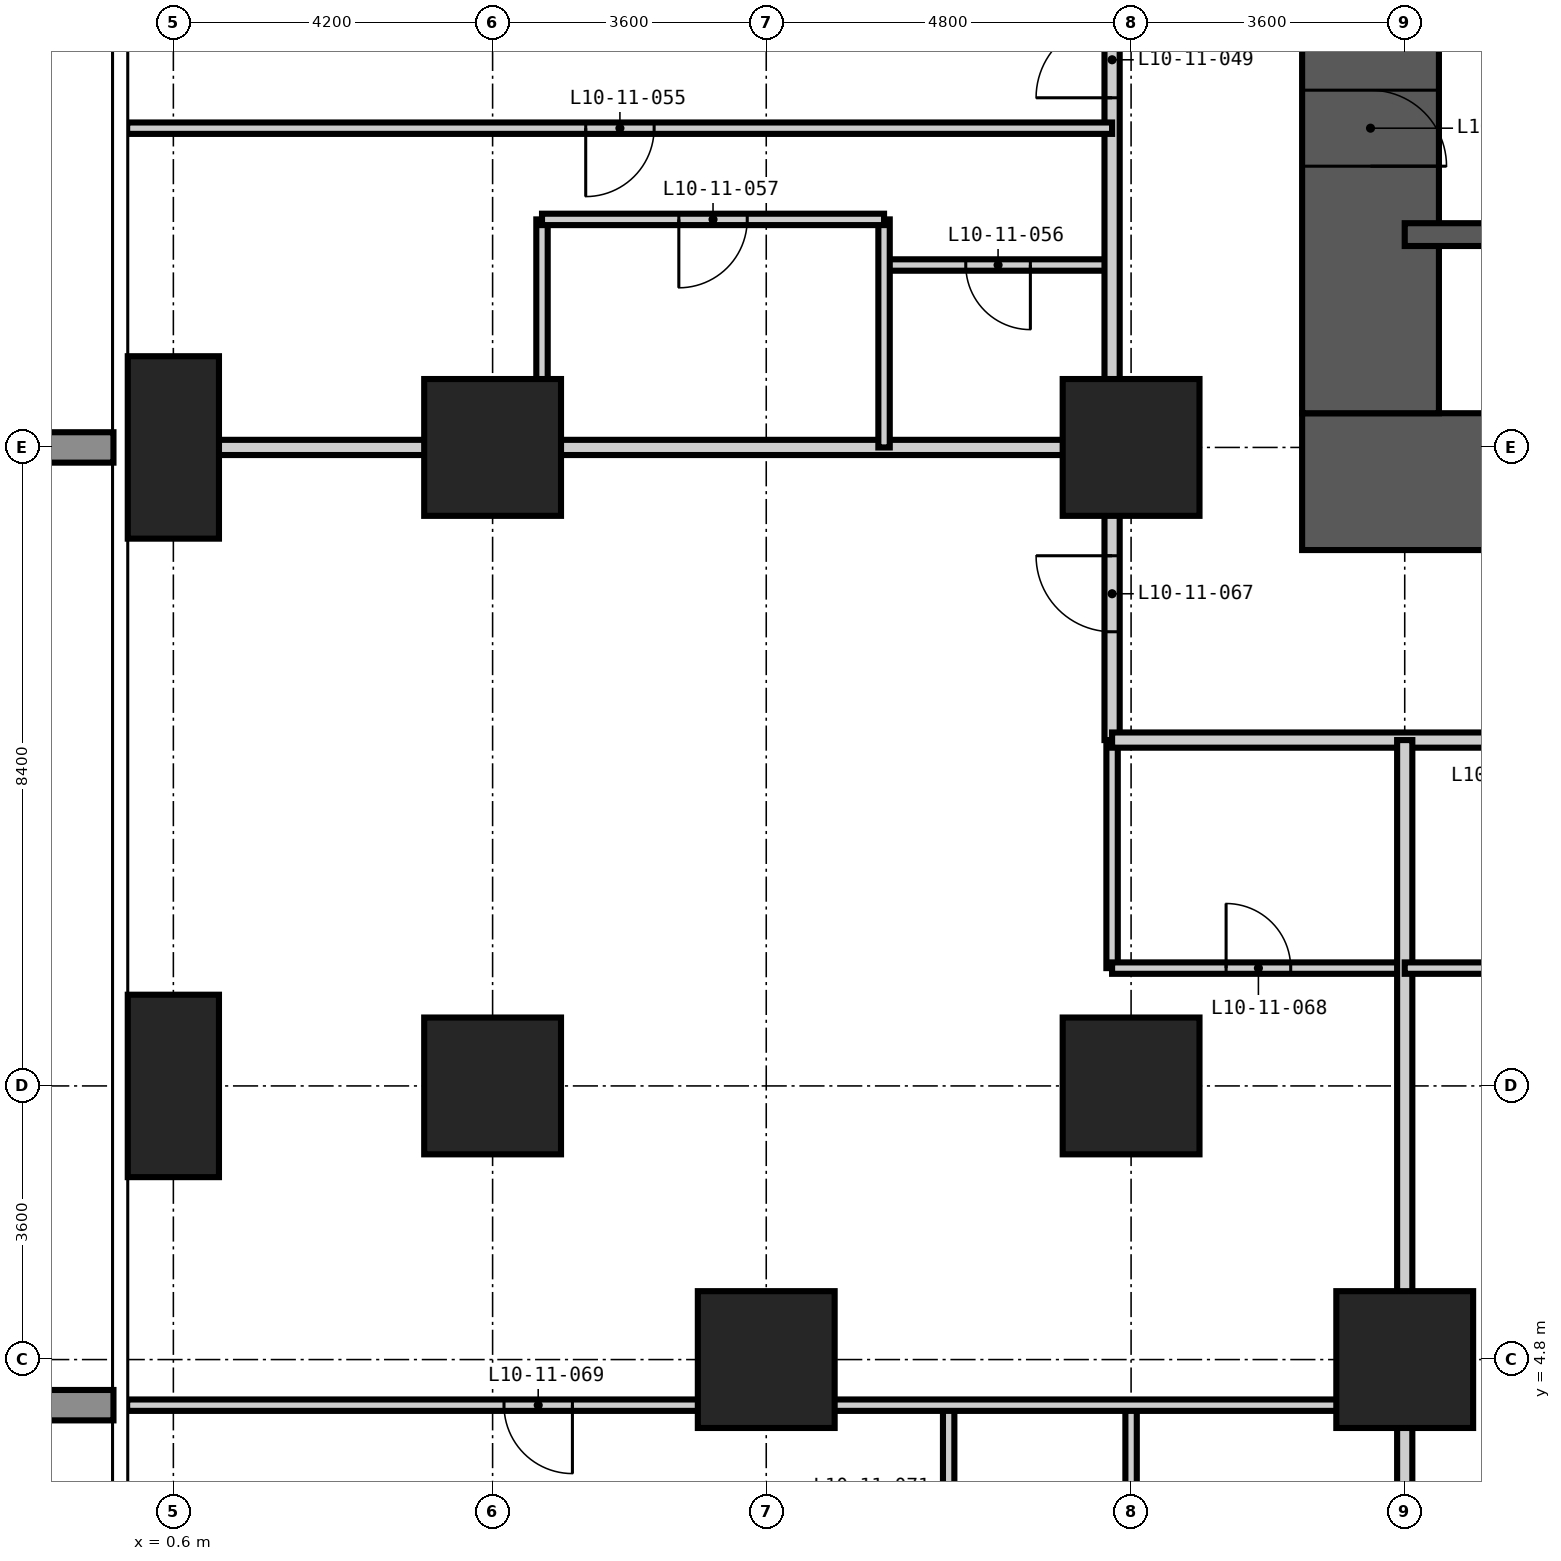
"""IFC4 building model, lengths in metres.
Left out: names, types, materials, properties, quantities, classifications, styles, units other than length and angle.
Written with IfcOpenShell. Run it as: python <this file> out.ifc"""

import sys

from ifc_helpers import new_model, si_unit, direction, frame, frame_2d, origin, origin_2d, place, context, subcontext, project, spatial, rectangle, extrude, element, fill, save


model = new_model("IFC4")
c1 = context("Model", 3, precision=1e-05, world=origin(), true_north=direction((0.0, 1.0)))
c2 = subcontext(c1, "Body", "Model", "MODEL_VIEW")
j1 = project(units=[si_unit("LENGTHUNIT", "METRE"), si_unit("PLANEANGLEUNIT", "RADIAN")], contexts=[c1])
p1 = place(None, origin())
s1 = spatial("IfcSite", under=j1, at=p1, CompositionType="ELEMENT")
p2 = place(p1, origin())
s2 = spatial("IfcBuilding", under=s1, at=p2, CompositionType="ELEMENT")
p3 = place(p2, frame((0.0, 0.0, 45.0)))
s3 = spatial("IfcBuildingStorey", under=s2, at=p3, CompositionType="ELEMENT", Elevation=45.0)
for number, where, z_axis, x_axis in (
    (1, (0.6, 8.4, -0.35), (0.0, 0.0, 1.0), (1.0, 0.0, 0.0)),
    (2, (0.6, 16.8, -0.35), (0.0, 0.0, 1.0), (1.0, 0.0, 0.0)),
):
    element("IfcColumn", number, at=place(p3, frame(where, z_axis=z_axis, x_axis=x_axis)), inside=s3, PredefinedType="COLUMN", context=c2, shape_type="SweptSolid", body=[
        extrude(rectangle(XDim=1.2, YDim=2.4, at=origin_2d()), origin(), (0.0, 0.0, 1.0), 3.6),
    ])
for number, where, z_axis, x_axis in (
    (3, (4.8, 8.4, -0.35), (0.0, 0.0, 1.0), (1.0, 0.0, 0.0)),
    (4, (4.8, 16.8, -0.35), (0.0, 0.0, 1.0), (1.0, 0.0, 0.0)),
    (5, (8.4, 4.8, -0.35), (0.0, 0.0, 1.0), (1.0, 0.0, 0.0)),
    (6, (13.2, 8.4, -0.35), (0.0, 0.0, 1.0), (1.0, 0.0, 0.0)),
    (7, (13.2, 16.8, -0.35), (0.0, 0.0, 1.0), (1.0, 0.0, 0.0)),
    (8, (16.8, 4.8, -0.35), (0.0, 0.0, 1.0), (1.0, 0.0, 0.0)),
):
    element("IfcColumn", number, at=place(p3, frame(where, z_axis=z_axis, x_axis=x_axis)), inside=s3, PredefinedType="COLUMN", context=c2, shape_type="SweptSolid", body=[
        extrude(rectangle(XDim=1.8, YDim=1.8, at=origin_2d()), origin(), (0.0, 0.0, 1.0), 3.6),
    ])
p4 = place(p3, frame((15.45, 16.35, -0.35), z_axis=(0.0, 0.0, 1.0), x_axis=(1.0, 0.0, 0.0)))
e9 = element("IfcWall", 9, at=p4, inside=s3, PredefinedType="SHEAR", context=c2, shape_type="SweptSolid", body=[
    extrude(rectangle(XDim=27.9, YDim=1.8, at=frame_2d((13.95, 0.0))), origin(), (0.0, 0.0, 1.0), 3.6),
])
p5 = place(p4, frame((13.45, 0.0, 0.35)))
e10 = element("IfcOpeningElement", 10, at=p5, cuts=e9, PredefinedType="OPENING", context=c2, shape_type="SweptSolid", body=[
    extrude(rectangle(XDim=1.0, YDim=2.1, at=frame_2d((0.5, 1.05))), frame((0.0, 0.91, 0.0), z_axis=(0.0, -1.0, 0.0), x_axis=(1.0, 0.0, 0.0)), (0.0, 0.0, 1.0), 1.82),
])
p6 = place(p4, frame((19.75, 0.0, 0.35)))
e11 = element("IfcOpeningElement", 11, at=p6, cuts=e9, PredefinedType="OPENING", context=c2, shape_type="SweptSolid", body=[
    extrude(rectangle(XDim=1.0, YDim=2.1, at=frame_2d((0.5, 1.05))), frame((0.0, 0.91, 0.0), z_axis=(0.0, -1.0, 0.0), x_axis=(1.0, 0.0, 0.0)), (0.0, 0.0, 1.0), 1.82),
])
p7 = place(p3, frame((16.35, 41.55, -0.35), z_axis=(0.0, 0.0, 1.0), x_axis=(0.0, -1.0, 0.0)))
e12 = element("IfcWall", 12, at=p7, inside=s3, PredefinedType="SHEAR", context=c2, shape_type="SweptSolid", body=[
    extrude(rectangle(XDim=24.3, YDim=1.8, at=frame_2d((12.15, 0.0))), origin(), (0.0, 0.0, 1.0), 3.6),
])
p8 = place(p7, frame((11.25, 0.0, 0.35)))
e13 = element("IfcOpeningElement", 13, at=p8, cuts=e12, PredefinedType="OPENING", context=c2, shape_type="SweptSolid", body=[
    extrude(rectangle(XDim=1.8, YDim=2.2, at=frame_2d((0.9, 1.1))), frame((0.0, 0.91, 0.0), z_axis=(0.0, -1.0, 0.0), x_axis=(1.0, 0.0, 0.0)), (0.0, 0.0, 1.0), 1.82),
])
p9 = place(p7, frame((20.05, 0.0, 0.35)))
e14 = element("IfcOpeningElement", 14, at=p9, cuts=e12, PredefinedType="OPENING", context=c2, shape_type="SweptSolid", body=[
    extrude(rectangle(XDim=1.0, YDim=2.1, at=frame_2d((0.5, 1.05))), frame((0.0, 0.91, 0.0), z_axis=(0.0, -1.0, 0.0), x_axis=(1.0, 0.0, 0.0)), (0.0, 0.0, 1.0), 1.82),
])
p10 = place(p7, frame((5.35, 0.0, 0.35)))
e15 = element("IfcOpeningElement", 15, at=p10, cuts=e12, PredefinedType="OPENING", context=c2, shape_type="SweptSolid", body=[
    extrude(rectangle(XDim=1.0, YDim=2.1, at=frame_2d((0.5, 1.05))), frame((0.0, 0.91, 0.0), z_axis=(0.0, -1.0, 0.0), x_axis=(1.0, 0.0, 0.0)), (0.0, 0.0, 1.0), 1.82),
])
p11 = place(p3, frame((16.8, 19.6, -0.35), z_axis=(0.0, 0.0, 1.0), x_axis=(1.0, 0.0, 0.0)))
e16 = element("IfcWall", 16, at=p11, inside=s3, PredefinedType="SHEAR", context=c2, shape_type="SweptSolid", body=[
    extrude(rectangle(XDim=8.4, YDim=0.3, at=frame_2d((4.2, 0.0))), origin(), (0.0, 0.0, 1.0), 3.6),
])
p12 = place(p3, frame((12.95, 9.95, 0.0), z_axis=(0.0, 0.0, 1.0), x_axis=(0.0, 1.0, 0.0)))
e17 = element("IfcWall", 17, at=p12, inside=s3, PredefinedType="PARTITIONING", context=c2, shape_type="SweptSolid", body=[
    extrude(rectangle(XDim=3.0, YDim=0.15, at=frame_2d((1.5, 0.0))), origin(), (0.0, 0.0, 1.0), 3.25),
])
p13 = place(p3, frame((12.95, 9.95, 0.0), z_axis=(0.0, 0.0, 1.0), x_axis=(1.0, 0.0, 0.0)))
e18 = element("IfcWall", 18, at=p13, inside=s3, PredefinedType="PARTITIONING", context=c2, shape_type="SweptSolid", body=[
    extrude(rectangle(XDim=3.85, YDim=0.15, at=frame_2d((1.925, 0.0))), origin(), (0.0, 0.0, 1.0), 3.25),
])
p14 = place(p13, frame((1.5, 0.0, 0.0)))
e19 = element("IfcOpeningElement", 19, at=p14, cuts=e18, PredefinedType="OPENING", context=c2, shape_type="SweptSolid", body=[
    extrude(rectangle(XDim=0.85, YDim=2.1, at=frame_2d((0.425, 1.05))), frame((0.0, 0.085, 0.0), z_axis=(0.0, -1.0, 0.0), x_axis=(1.0, 0.0, 0.0)), (0.0, 0.0, 1.0), 0.17),
])
p15 = place(p3, frame((9.95, 19.2, 0.0), z_axis=(0.0, 0.0, 1.0), x_axis=(1.0, 0.0, 0.0)))
e20 = element("IfcWall", 20, at=p15, inside=s3, PredefinedType="PARTITIONING", context=c2, shape_type="SweptSolid", body=[
    extrude(rectangle(XDim=3.0, YDim=0.15, at=frame_2d((1.5, 0.0))), origin(), (0.0, 0.0, 1.0), 3.25),
])
p16 = place(p15, frame((1.075, 0.0, 0.0)))
e21 = element("IfcOpeningElement", 21, at=p16, cuts=e20, PredefinedType="OPENING", context=c2, shape_type="SweptSolid", body=[
    extrude(rectangle(XDim=0.85, YDim=2.1, at=frame_2d((0.425, 1.05))), frame((0.0, 0.085, 0.0), z_axis=(0.0, -1.0, 0.0), x_axis=(1.0, 0.0, 0.0)), (0.0, 0.0, 1.0), 0.17),
])
p17 = place(p3, frame((12.95, 12.95, 0.0), z_axis=(0.0, 0.0, 1.0), x_axis=(0.0, 1.0, 0.0)))
e22 = element("IfcWall", 22, at=p17, inside=s3, PredefinedType="PARTITIONING", context=c2, shape_type="SweptSolid", body=[
    extrude(rectangle(XDim=32.6, YDim=0.2, at=frame_2d((16.3, 0.0))), origin(), (0.0, 0.0, 1.0), 3.25),
])
p18 = place(p17, frame((8.45, 0.0, 0.0)))
e23 = element("IfcOpeningElement", 23, at=p18, cuts=e22, PredefinedType="OPENING", context=c2, shape_type="SweptSolid", body=[
    extrude(rectangle(XDim=1.0, YDim=2.2, at=frame_2d((0.5, 1.1))), frame((0.0, 0.11, 0.0), z_axis=(0.0, -1.0, 0.0), x_axis=(1.0, 0.0, 0.0)), (0.0, 0.0, 1.0), 0.22),
])
p19 = place(p17, frame((16.7, 0.0, 0.0)))
e24 = element("IfcOpeningElement", 24, at=p19, cuts=e22, PredefinedType="OPENING", context=c2, shape_type="SweptSolid", body=[
    extrude(rectangle(XDim=1.0, YDim=2.2, at=frame_2d((0.5, 1.1))), frame((0.0, 0.11, 0.0), z_axis=(0.0, -1.0, 0.0), x_axis=(1.0, 0.0, 0.0)), (0.0, 0.0, 1.0), 0.22),
])
p20 = place(p17, frame((23.6, 0.0, 0.0)))
e25 = element("IfcOpeningElement", 25, at=p20, cuts=e22, PredefinedType="OPENING", context=c2, shape_type="SweptSolid", body=[
    extrude(rectangle(XDim=1.0, YDim=2.2, at=frame_2d((0.5, 1.1))), frame((0.0, 0.11, 0.0), z_axis=(0.0, -1.0, 0.0), x_axis=(1.0, 0.0, 0.0)), (0.0, 0.0, 1.0), 0.22),
])
p21 = place(p17, frame((25.1, 0.0, 0.0)))
e26 = element("IfcOpeningElement", 26, at=p21, cuts=e22, PredefinedType="OPENING", context=c2, shape_type="SweptSolid", body=[
    extrude(rectangle(XDim=1.0, YDim=2.2, at=frame_2d((0.5, 1.1))), frame((0.0, 0.11, 0.0), z_axis=(0.0, -1.0, 0.0), x_axis=(1.0, 0.0, 0.0)), (0.0, 0.0, 1.0), 0.22),
])
p22 = place(p17, frame((1.425, 0.0, 0.0)))
e27 = element("IfcOpeningElement", 27, at=p22, cuts=e22, PredefinedType="OPENING", context=c2, shape_type="SweptSolid", body=[
    extrude(rectangle(XDim=1.0, YDim=2.2, at=frame_2d((0.5, 1.1))), frame((0.0, 0.11, 0.0), z_axis=(0.0, -1.0, 0.0), x_axis=(1.0, 0.0, 0.0)), (0.0, 0.0, 1.0), 0.22),
])
p23 = place(p17, frame((30.325, 0.0, 0.0)))
e28 = element("IfcOpeningElement", 28, at=p23, cuts=e22, PredefinedType="OPENING", context=c2, shape_type="SweptSolid", body=[
    extrude(rectangle(XDim=1.0, YDim=2.2, at=frame_2d((0.5, 1.1))), frame((0.0, 0.11, 0.0), z_axis=(0.0, -1.0, 0.0), x_axis=(1.0, 0.0, 0.0)), (0.0, 0.0, 1.0), 0.22),
])
p24 = place(p3, frame((45.25, 12.95, 0.0), z_axis=(0.0, 0.0, 1.0), x_axis=(-1.0, 0.0, 0.0)))
e29 = element("IfcWall", 29, at=p24, inside=s3, PredefinedType="PARTITIONING", context=c2, shape_type="SweptSolid", body=[
    extrude(rectangle(XDim=32.3, YDim=0.2, at=frame_2d((16.15, 0.0))), origin(), (0.0, 0.0, 1.0), 3.25),
])
p25 = place(p24, frame((24.65, 0.0, 0.0)))
e30 = element("IfcOpeningElement", 30, at=p25, cuts=e29, PredefinedType="OPENING", context=c2, shape_type="SweptSolid", body=[
    extrude(rectangle(XDim=1.0, YDim=2.2, at=frame_2d((0.5, 1.1))), frame((0.0, 0.11, 0.0), z_axis=(0.0, -1.0, 0.0), x_axis=(1.0, 0.0, 0.0)), (0.0, 0.0, 1.0), 0.22),
])
p26 = place(p24, frame((16.25, 0.0, 0.0)))
e31 = element("IfcOpeningElement", 31, at=p26, cuts=e29, PredefinedType="OPENING", context=c2, shape_type="SweptSolid", body=[
    extrude(rectangle(XDim=1.0, YDim=2.2, at=frame_2d((0.5, 1.1))), frame((0.0, 0.11, 0.0), z_axis=(0.0, -1.0, 0.0), x_axis=(1.0, 0.0, 0.0)), (0.0, 0.0, 1.0), 0.22),
])
p27 = place(p24, frame((7.85, 0.0, 0.0)))
e32 = element("IfcOpeningElement", 32, at=p27, cuts=e29, PredefinedType="OPENING", context=c2, shape_type="SweptSolid", body=[
    extrude(rectangle(XDim=1.0, YDim=2.2, at=frame_2d((0.5, 1.1))), frame((0.0, 0.11, 0.0), z_axis=(0.0, -1.0, 0.0), x_axis=(1.0, 0.0, 0.0)), (0.0, 0.0, 1.0), 0.22),
])
for number, where, z_axis, x_axis in (
    (33, (16.8, -0.008, 0.0), (0.0, 0.0, 1.0), (0.0, 1.0, 0.0)),
    (34, (-0.008, 16.8, 0.0), (0.0, 0.0, 1.0), (1.0, 0.0, 0.0)),
):
    element("IfcWall", number, at=place(p3, frame(where, z_axis=z_axis, x_axis=x_axis)), inside=s3, PredefinedType="PARTITIONING", context=c2, shape_type="SweptSolid", body=[
        extrude(rectangle(XDim=12.958, YDim=0.2, at=frame_2d((6.479, 0.0))), origin(), (0.0, 0.0, 1.0), 3.25),
    ])
for number, where, z_axis, x_axis in (
    (35, (5.45, 16.8, 0.0), (0.0, 0.0, 1.0), (0.0, 1.0, 0.0)),
    (36, (9.95, 16.8, 0.0), (0.0, 0.0, 1.0), (0.0, 1.0, 0.0)),
):
    element("IfcWall", number, at=place(p3, frame(where, z_axis=z_axis, x_axis=x_axis)), inside=s3, PredefinedType="PARTITIONING", context=c2, shape_type="SweptSolid", body=[
        extrude(rectangle(XDim=3.0, YDim=0.15, at=frame_2d((1.5, 0.0))), origin(), (0.0, 0.0, 1.0), 3.25),
    ])
p28 = place(p3, frame((10.8, 1.2, 0.0), z_axis=(0.0, 0.0, 1.0), x_axis=(0.0, 1.0, 0.0)))
e37 = element("IfcWall", 37, at=p28, inside=s3, PredefinedType="PARTITIONING", context=c2, shape_type="SweptSolid", body=[
    extrude(rectangle(XDim=3.0, YDim=0.15, at=frame_2d((1.5, 0.0))), origin(), (0.0, 0.0, 1.0), 3.25),
])
p29 = place(p28, frame((1.05, 0.0, 0.0)))
e38 = element("IfcOpeningElement", 38, at=p29, cuts=e37, PredefinedType="OPENING", context=c2, shape_type="SweptSolid", body=[
    extrude(rectangle(XDim=0.9, YDim=2.1, at=frame_2d((0.45, 1.05))), frame((0.0, 0.085, 0.0), z_axis=(0.0, -1.0, 0.0), x_axis=(1.0, 0.0, 0.0)), (0.0, 0.0, 1.0), 0.17),
])
p30 = place(p3, frame((13.2, 1.2, 0.0), z_axis=(0.0, 0.0, 1.0), x_axis=(0.0, 1.0, 0.0)))
e39 = element("IfcWall", 39, at=p30, inside=s3, PredefinedType="PARTITIONING", context=c2, shape_type="SweptSolid", body=[
    extrude(rectangle(XDim=3.0, YDim=0.15, at=frame_2d((1.5, 0.0))), origin(), (0.0, 0.0, 1.0), 3.25),
])
p31 = place(p3, frame((-0.008, 4.2, 0.0), z_axis=(0.0, 0.0, 1.0), x_axis=(1.0, 0.0, 0.0)))
e40 = element("IfcWall", 40, at=p31, inside=s3, PredefinedType="PARTITIONING", context=c2, shape_type="SweptSolid", body=[
    extrude(rectangle(XDim=16.808, YDim=0.15, at=frame_2d((8.404, 0.0))), origin(), (0.0, 0.0, 1.0), 3.25),
])
p32 = place(p31, frame((4.958, 0.0, 0.0)))
e41 = element("IfcOpeningElement", 41, at=p32, cuts=e40, PredefinedType="OPENING", context=c2, shape_type="SweptSolid", body=[
    extrude(rectangle(XDim=0.9, YDim=2.1, at=frame_2d((0.45, 1.05))), frame((0.0, 0.085, 0.0), z_axis=(0.0, -1.0, 0.0), x_axis=(1.0, 0.0, 0.0)), (0.0, 0.0, 1.0), 0.17),
])
p33 = place(p3, frame((16.8, 9.95, 0.0), z_axis=(0.0, 0.0, 1.0), x_axis=(1.0, 0.0, 0.0)))
e42 = element("IfcWall", 42, at=p33, inside=s3, PredefinedType="PARTITIONING", context=c2, shape_type="SweptSolid", body=[
    extrude(rectangle(XDim=2.4, YDim=0.15, at=frame_2d((1.2, 0.0))), origin(), (0.0, 0.0, 1.0), 3.25),
])
p34 = place(p3, frame((5.45, 19.8, 0.0), z_axis=(0.0, 0.0, 1.0), x_axis=(1.0, 0.0, 0.0)))
e43 = element("IfcWall", 43, at=p34, inside=s3, PredefinedType="PARTITIONING", context=c2, shape_type="SweptSolid", body=[
    extrude(rectangle(XDim=4.5, YDim=0.15, at=frame_2d((2.25, 0.0))), origin(), (0.0, 0.0, 1.0), 3.25),
])
p35 = place(p34, frame((1.8, 0.0, 0.0)))
e44 = element("IfcOpeningElement", 44, at=p35, cuts=e43, PredefinedType="OPENING", context=c2, shape_type="SweptSolid", body=[
    extrude(rectangle(XDim=0.9, YDim=2.1, at=frame_2d((0.45, 1.05))), frame((0.0, 0.085, 0.0), z_axis=(0.0, -1.0, 0.0), x_axis=(1.0, 0.0, 0.0)), (0.0, 0.0, 1.0), 0.17),
])
p36 = place(p3, frame((-0.008, 21.0, 0.0), z_axis=(0.0, 0.0, 1.0), x_axis=(1.0, 0.0, 0.0)))
e45 = element("IfcWall", 45, at=p36, inside=s3, PredefinedType="PARTITIONING", context=c2, shape_type="SweptSolid", body=[
    extrude(rectangle(XDim=12.958, YDim=0.15, at=frame_2d((6.479, 0.0))), origin(), (0.0, 0.0, 1.0), 3.25),
])
p37 = place(p36, frame((6.033, 0.0, 0.0)))
e46 = element("IfcOpeningElement", 46, at=p37, cuts=e45, PredefinedType="OPENING", context=c2, shape_type="SweptSolid", body=[
    extrude(rectangle(XDim=0.9, YDim=2.1, at=frame_2d((0.45, 1.05))), frame((0.0, 0.085, 0.0), z_axis=(0.0, -1.0, 0.0), x_axis=(1.0, 0.0, 0.0)), (0.0, 0.0, 1.0), 0.17),
])
p38 = place(p18, origin())
e47 = element("IfcDoor", 47, at=p38, inside=s3, OperationType="SINGLE_SWING_LEFT", PredefinedType="DOOR", context=c2, shape_type="SweptSolid", body=[
    extrude(rectangle(XDim=1.0, YDim=2.2, at=frame_2d((0.5, 1.1))), frame((0.0, 0.025, 0.0), z_axis=(0.0, -1.0, 0.0), x_axis=(1.0, 0.0, 0.0)), (0.0, 0.0, 1.0), 0.05),
])
fill(e23, e47)
p39 = place(p37, frame((0.9, 0.0, 0.0), z_axis=(0.0, 0.0, 1.0), x_axis=(-1.0, 0.0, 0.0)))
e48 = element("IfcDoor", 48, at=p39, inside=s3, OperationType="SINGLE_SWING_RIGHT", PredefinedType="DOOR", context=c2, shape_type="SweptSolid", body=[
    extrude(rectangle(XDim=0.9, YDim=2.1, at=frame_2d((0.45, 1.05))), frame((0.0, 0.025, 0.0), z_axis=(0.0, -1.0, 0.0), x_axis=(1.0, 0.0, 0.0)), (0.0, 0.0, 1.0), 0.05),
])
fill(e46, e48)
p40 = place(p16, frame((0.85, 0.0, 0.0), z_axis=(0.0, 0.0, 1.0), x_axis=(-1.0, 0.0, 0.0)))
e49 = element("IfcDoor", 49, at=p40, inside=s3, OperationType="SINGLE_SWING_LEFT", PredefinedType="DOOR", context=c2, shape_type="SweptSolid", body=[
    extrude(rectangle(XDim=0.85, YDim=2.1, at=frame_2d((0.425, 1.05))), frame((0.0, 0.025, 0.0), z_axis=(0.0, -1.0, 0.0), x_axis=(1.0, 0.0, 0.0)), (0.0, 0.0, 1.0), 0.05),
])
fill(e21, e49)
p41 = place(p35, frame((0.9, 0.0, 0.0), z_axis=(0.0, 0.0, 1.0), x_axis=(-1.0, 0.0, 0.0)))
e50 = element("IfcDoor", 50, at=p41, inside=s3, OperationType="SINGLE_SWING_RIGHT", PredefinedType="DOOR", context=c2, shape_type="SweptSolid", body=[
    extrude(rectangle(XDim=0.9, YDim=2.1, at=frame_2d((0.45, 1.05))), frame((0.0, 0.025, 0.0), z_axis=(0.0, -1.0, 0.0), x_axis=(1.0, 0.0, 0.0)), (0.0, 0.0, 1.0), 0.05),
])
fill(e44, e50)
p42 = place(p22, origin())
e51 = element("IfcDoor", 51, at=p42, inside=s3, OperationType="SINGLE_SWING_RIGHT", PredefinedType="DOOR", context=c2, shape_type="SweptSolid", body=[
    extrude(rectangle(XDim=1.0, YDim=2.2, at=frame_2d((0.5, 1.1))), frame((0.0, 0.025, 0.0), z_axis=(0.0, -1.0, 0.0), x_axis=(1.0, 0.0, 0.0)), (0.0, 0.0, 1.0), 0.05),
])
fill(e27, e51)
p43 = place(p14, origin())
e52 = element("IfcDoor", 52, at=p43, inside=s3, OperationType="SINGLE_SWING_LEFT", PredefinedType="DOOR", context=c2, shape_type="SweptSolid", body=[
    extrude(rectangle(XDim=0.85, YDim=2.1, at=frame_2d((0.425, 1.05))), frame((0.0, 0.025, 0.0), z_axis=(0.0, -1.0, 0.0), x_axis=(1.0, 0.0, 0.0)), (0.0, 0.0, 1.0), 0.05),
])
fill(e19, e52)
p44 = place(p32, frame((0.9, 0.0, 0.0), z_axis=(0.0, 0.0, 1.0), x_axis=(-1.0, 0.0, 0.0)))
e53 = element("IfcDoor", 53, at=p44, inside=s3, OperationType="SINGLE_SWING_LEFT", PredefinedType="DOOR", context=c2, shape_type="SweptSolid", body=[
    extrude(rectangle(XDim=0.9, YDim=2.1, at=frame_2d((0.45, 1.05))), frame((0.0, 0.025, 0.0), z_axis=(0.0, -1.0, 0.0), x_axis=(1.0, 0.0, 0.0)), (0.0, 0.0, 1.0), 0.05),
])
fill(e41, e53)
p45 = place(p9, origin())
e54 = element("IfcDoor", 54, at=p45, inside=s3, OperationType="SINGLE_SWING_RIGHT", PredefinedType="DOOR", context=c2, shape_type="SweptSolid", body=[
    extrude(rectangle(XDim=1.0, YDim=2.1, at=frame_2d((0.5, 1.05))), frame((0.0, 0.025, 0.0), z_axis=(0.0, -1.0, 0.0), x_axis=(1.0, 0.0, 0.0)), (0.0, 0.0, 1.0), 0.05),
])
fill(e14, e54)
save(model, sys.argv[1])
